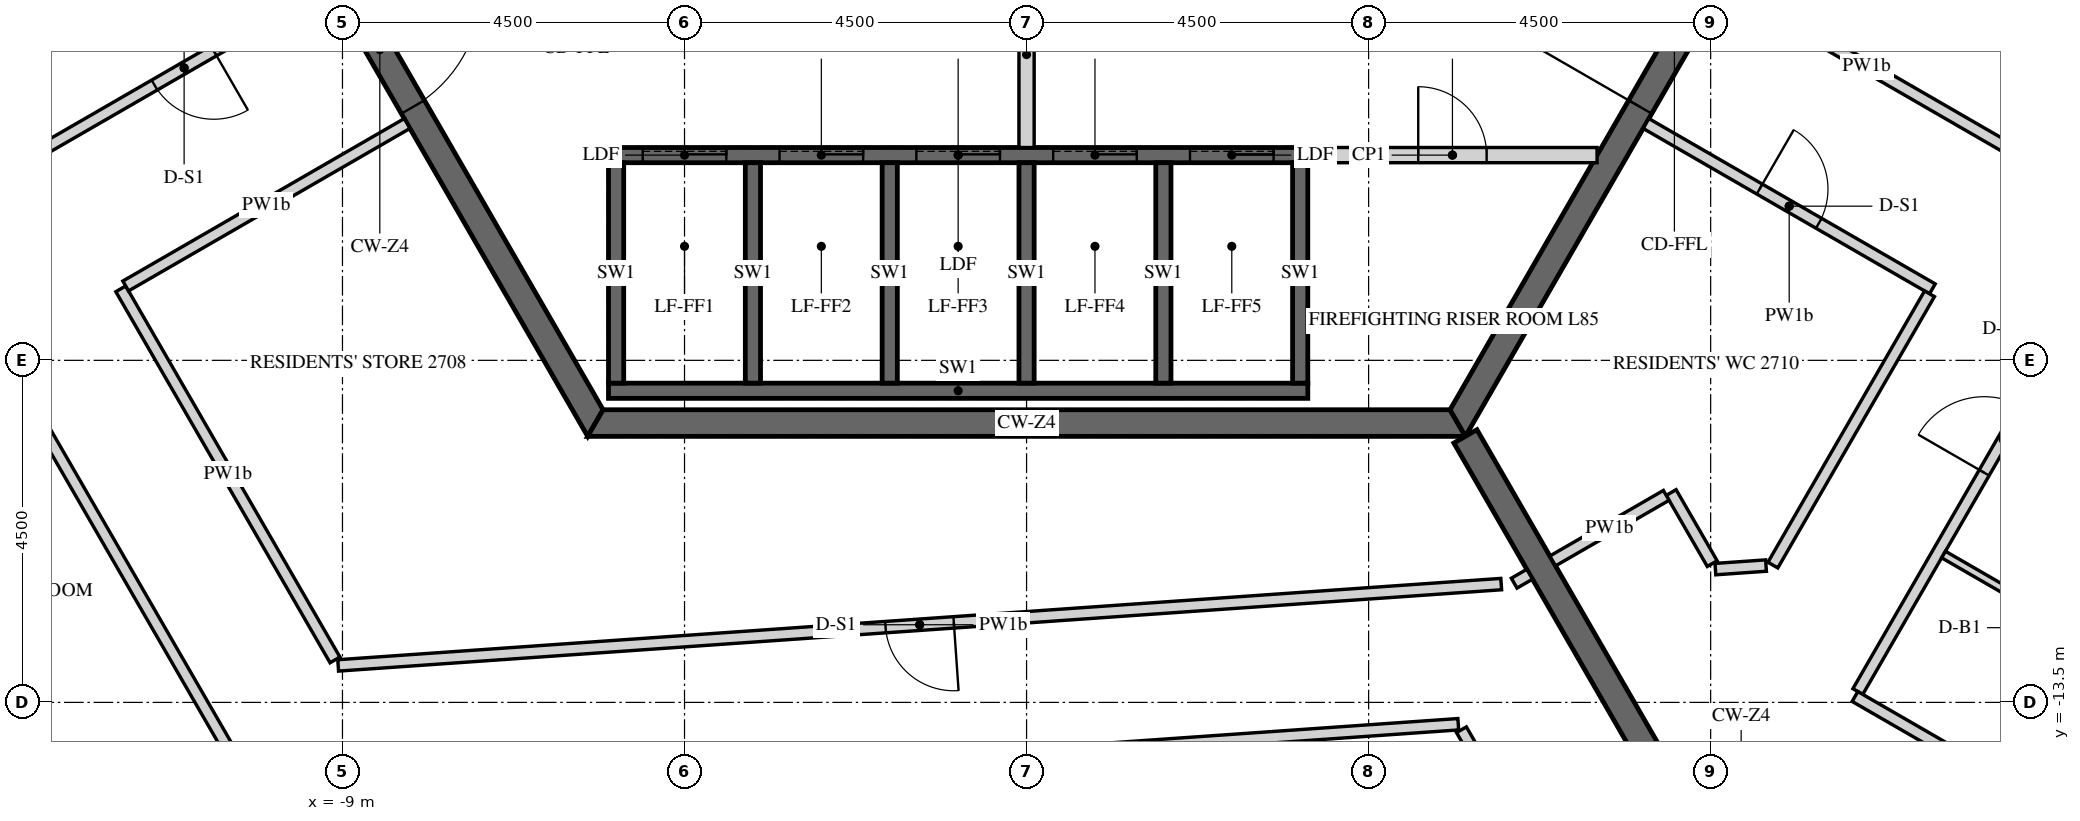
"""IFC4 building model, lengths in metres.
Left out: names, types, materials, properties, quantities, classifications, styles, units other than length and angle.
Written with IfcOpenShell. Run it as: python <this file> out.ifc"""

import sys

from ifc_helpers import new_model, si_unit, direction, frame, frame_2d, origin, place, context, subcontext, project, spatial, polyline, rectangle, outline, extrude, element, fill, save


model = new_model("IFC4")
c1 = context("Model", 3, precision=1e-05, world=origin(), true_north=direction((0.0, 1.0)))
c2 = subcontext(c1, "Body", "Model", "MODEL_VIEW")
j1 = project(units=[si_unit("LENGTHUNIT", "METRE"), si_unit("PLANEANGLEUNIT", "RADIAN")], contexts=[c1])
p1 = place(None, origin())
s1 = spatial("IfcSite", under=j1, at=p1, CompositionType="ELEMENT")
p2 = place(p1, origin())
s2 = spatial("IfcBuilding", under=s1, at=p2, CompositionType="ELEMENT")
p3 = place(p2, frame((0.0, 0.0, 353.4)))
s3 = spatial("IfcBuildingStorey", under=s2, at=p3, CompositionType="ELEMENT", Elevation=353.4)
p4 = place(p3, frame((-11.345, 0.0, -0.15), z_axis=(0.0, 0.0, 1.0), x_axis=(0.499995046907, -0.866028263435, 0.0)))
e1 = element("IfcWall", 1, at=p4, inside=s3, PredefinedType="SHEAR", context=c2, shape_type="SweptSolid", body=[
    extrude(outline(polyline([(-0.101, -0.175), (11.446, -0.175), (11.244, 0.175), (0.101, 0.175), (-0.101, -0.175)])), origin(), (0.0, 0.0, 1.0), 3.9),
])
p5 = place(p4, frame((4.744, 0.0, 0.15)))
e2 = element("IfcOpeningElement", 2, at=p5, cuts=e1, PredefinedType="OPENING", context=c2, shape_type="SweptSolid", body=[
    extrude(rectangle(XDim=1.8, YDim=2.4, at=frame_2d((0.9, 1.2))), frame((0.0, 0.185, 0.0), z_axis=(0.0, -1.0, 0.0), x_axis=(1.0, 0.0, 0.0)), (0.0, 0.0, 1.0), 0.37),
])
p6 = place(p3, frame((-5.673, -9.825, -0.15), z_axis=(0.0, 0.0, 1.0), x_axis=(1.0, 0.0, 0.0)))
e3 = element("IfcWall", 3, at=p6, inside=s3, PredefinedType="SHEAR", context=c2, shape_type="SweptSolid", body=[
    extrude(outline(polyline([(-0.101, -0.175), (11.446, -0.175), (11.244, 0.175), (0.101, 0.175), (-0.101, -0.175)])), origin(), (0.0, 0.0, 1.0), 3.9),
])
p7 = place(p3, frame((5.673, -9.825, -0.15), z_axis=(0.0, 0.0, 1.0), x_axis=(0.499995046907, 0.866028263435, 0.0)))
e4 = element("IfcWall", 4, at=p7, inside=s3, PredefinedType="SHEAR", context=c2, shape_type="SweptSolid", body=[
    extrude(outline(polyline([(-0.101, -0.175), (11.446, -0.175), (11.244, 0.175), (0.101, 0.175), (-0.101, -0.175)])), origin(), (0.0, 0.0, 1.0), 3.9),
])
p8 = place(p7, frame((4.801, 0.0, 0.15)))
e5 = element("IfcOpeningElement", 5, at=p8, cuts=e4, PredefinedType="OPENING", context=c2, shape_type="SweptSolid", body=[
    extrude(rectangle(XDim=1.8, YDim=2.4, at=frame_2d((0.9, 1.2))), frame((0.0, 0.185, 0.0), z_axis=(0.0, -1.0, 0.0), x_axis=(1.0, 0.0, 0.0)), (0.0, 0.0, 1.0), 0.37),
])
p9 = place(p3, frame((5.773, -10.0, -0.15), z_axis=(0.0, 0.0, 1.0), x_axis=(0.500007911273, -0.866020836161, 0.0)))
e6 = element("IfcWall", 6, at=p9, inside=s3, PredefinedType="SHEAR", context=c2, shape_type="SweptSolid", body=[
    extrude(rectangle(XDim=14.51, YDim=0.35, at=frame_2d((7.255, 0.0))), origin(), (0.0, 0.0, 1.0), 3.9),
])
p10 = place(p9, frame((6.355, 0.0, 0.15)))
e7 = element("IfcOpeningElement", 7, at=p10, cuts=e6, PredefinedType="OPENING", context=c2, shape_type="SweptSolid", body=[
    extrude(rectangle(XDim=1.8, YDim=2.4, at=frame_2d((0.9, 1.2))), frame((0.0, 0.185, 0.0), z_axis=(0.0, -1.0, 0.0), x_axis=(1.0, 0.0, 0.0)), (0.0, 0.0, 1.0), 0.37),
])
p11 = place(p3, frame((-5.5, -6.3, -0.25), z_axis=(0.0, 0.0, 1.0), x_axis=(1.0, 0.0, 0.0)))
e8 = element("IfcWall", 8, at=p11, inside=s3, PredefinedType="SHEAR", context=c2, shape_type="SweptSolid", body=[
    extrude(rectangle(XDim=9.2, YDim=0.2, at=frame_2d((4.6, 0.0))), origin(), (0.0, 0.0, 1.0), 3.9),
])
p12 = place(p11, frame((0.45, 0.0, 0.25)))
e9 = element("IfcOpeningElement", 9, at=p12, cuts=e8, PredefinedType="OPENING", context=c2, shape_type="SweptSolid", body=[
    extrude(rectangle(XDim=1.1, YDim=2.1, at=frame_2d((0.55, 1.05))), frame((0.0, 0.11, 0.0), z_axis=(0.0, -1.0, 0.0), x_axis=(1.0, 0.0, 0.0)), (0.0, 0.0, 1.0), 0.22),
])
p13 = place(p11, frame((2.25, 0.0, 0.25)))
e10 = element("IfcOpeningElement", 10, at=p13, cuts=e8, PredefinedType="OPENING", context=c2, shape_type="SweptSolid", body=[
    extrude(rectangle(XDim=1.1, YDim=2.1, at=frame_2d((0.55, 1.05))), frame((0.0, 0.11, 0.0), z_axis=(0.0, -1.0, 0.0), x_axis=(1.0, 0.0, 0.0)), (0.0, 0.0, 1.0), 0.22),
])
p14 = place(p11, frame((4.05, 0.0, 0.25)))
e11 = element("IfcOpeningElement", 11, at=p14, cuts=e8, PredefinedType="OPENING", context=c2, shape_type="SweptSolid", body=[
    extrude(rectangle(XDim=1.1, YDim=2.1, at=frame_2d((0.55, 1.05))), frame((0.0, 0.11, 0.0), z_axis=(0.0, -1.0, 0.0), x_axis=(1.0, 0.0, 0.0)), (0.0, 0.0, 1.0), 0.22),
])
p15 = place(p11, frame((5.85, 0.0, 0.25)))
e12 = element("IfcOpeningElement", 12, at=p15, cuts=e8, PredefinedType="OPENING", context=c2, shape_type="SweptSolid", body=[
    extrude(rectangle(XDim=1.1, YDim=2.1, at=frame_2d((0.55, 1.05))), frame((0.0, 0.11, 0.0), z_axis=(0.0, -1.0, 0.0), x_axis=(1.0, 0.0, 0.0)), (0.0, 0.0, 1.0), 0.22),
])
p16 = place(p11, frame((7.65, 0.0, 0.25)))
e13 = element("IfcOpeningElement", 13, at=p16, cuts=e8, PredefinedType="OPENING", context=c2, shape_type="SweptSolid", body=[
    extrude(rectangle(XDim=1.1, YDim=2.1, at=frame_2d((0.55, 1.05))), frame((0.0, 0.11, 0.0), z_axis=(0.0, -1.0, 0.0), x_axis=(1.0, 0.0, 0.0)), (0.0, 0.0, 1.0), 0.22),
])
p17 = place(p3, frame((-5.5, -9.4, -0.25), z_axis=(0.0, 0.0, 1.0), x_axis=(1.0, 0.0, 0.0)))
e14 = element("IfcWall", 14, at=p17, inside=s3, PredefinedType="SHEAR", context=c2, shape_type="SweptSolid", body=[
    extrude(rectangle(XDim=9.2, YDim=0.2, at=frame_2d((4.6, 0.0))), origin(), (0.0, 0.0, 1.0), 3.9),
])
for number, where, z_axis, x_axis in (
    (15, (-5.4, -9.3, -0.25), (0.0, 0.0, 1.0), (0.0, 1.0, 0.0)),
    (16, (-3.6, -9.3, -0.25), (0.0, 0.0, 1.0), (0.0, 1.0, 0.0)),
    (17, (-1.8, -9.3, -0.25), (0.0, 0.0, 1.0), (0.0, 1.0, 0.0)),
    (18, (0.0, -9.3, -0.25), (0.0, 0.0, 1.0), (0.0, 1.0, 0.0)),
    (19, (1.8, -9.3, -0.25), (0.0, 0.0, 1.0), (0.0, 1.0, 0.0)),
    (20, (3.6, -9.3, -0.25), (0.0, 0.0, 1.0), (0.0, 1.0, 0.0)),
):
    element("IfcWall", number, at=place(p3, frame(where, z_axis=z_axis, x_axis=x_axis)), inside=s3, PredefinedType="SHEAR", context=c2, shape_type="SweptSolid", body=[
        extrude(rectangle(XDim=2.9, YDim=0.2, at=frame_2d((1.45, 0.0))), origin(), (0.0, 0.0, 1.0), 3.9),
    ])
p18 = place(p3, frame((0.0, -6.2, 0.0), z_axis=(0.0, 0.0, 1.0), x_axis=(0.0, 1.0, 0.0)))
e21 = element("IfcWall", 21, at=p18, inside=s3, PredefinedType="PARTITIONING", context=c2, shape_type="SweptSolid", body=[
    extrude(rectangle(XDim=6.1, YDim=0.2, at=frame_2d((3.05, 0.0))), origin(), (0.0, 0.0, 1.0), 3.65),
])
p19 = place(p3, frame((3.7, -6.3, 0.0), z_axis=(0.0, 0.0, 1.0), x_axis=(1.0, 0.0, 0.0)))
e22 = element("IfcWall", 22, at=p19, inside=s3, PredefinedType="PARTITIONING", context=c2, shape_type="SweptSolid", body=[
    extrude(rectangle(XDim=3.806, YDim=0.2, at=frame_2d((1.903, 0.0))), origin(), (0.0, 0.0, 1.0), 3.65),
])
p20 = place(p19, frame((1.453, 0.0, 0.0)))
e23 = element("IfcOpeningElement", 23, at=p20, cuts=e22, PredefinedType="OPENING", context=c2, shape_type="SweptSolid", body=[
    extrude(rectangle(XDim=0.9, YDim=2.1, at=frame_2d((0.45, 1.05))), frame((0.0, 0.11, 0.0), z_axis=(0.0, -1.0, 0.0), x_axis=(1.0, 0.0, 0.0)), (0.0, 0.0, 1.0), 0.22),
])
p21 = place(p3, frame((-17.036, -2.792, 0.0), z_axis=(0.0, 0.0, 1.0), x_axis=(0.500006428338, -0.86602169235, 0.0)))
e24 = element("IfcWall", 24, at=p21, inside=s3, PredefinedType="PARTITIONING", context=c2, shape_type="SweptSolid", body=[
    extrude(rectangle(XDim=13.966, YDim=0.15, at=frame_2d((6.983, 0.0))), origin(), (0.0, 0.0, 1.0), 2.82),
])
p22 = place(p21, frame((3.325, 0.0, 0.0)))
e25 = element("IfcOpeningElement", 25, at=p22, cuts=e24, PredefinedType="OPENING", context=c2, shape_type="SweptSolid", body=[
    extrude(rectangle(XDim=1.0, YDim=2.1, at=frame_2d((0.5, 1.05))), frame((0.0, 0.085, 0.0), z_axis=(0.0, -1.0, 0.0), x_axis=(1.0, 0.0, 0.0)), (0.0, 0.0, 1.0), 0.17),
])
p23 = place(p3, frame((-9.97, -14.882, 0.0), z_axis=(0.0, 0.0, 1.0), x_axis=(0.997564384496, 0.06975169378, 0.0)))
e26 = element("IfcWall", 26, at=p23, inside=s3, PredefinedType="PARTITIONING", context=c2, shape_type="SweptSolid", body=[
    extrude(rectangle(XDim=15.688, YDim=0.15, at=frame_2d((7.844, 0.0))), origin(), (0.0, 0.0, 1.0), 2.82),
])
p24 = place(p3, frame((5.721, -13.86, 0.0), z_axis=(0.0, 0.0, 1.0), x_axis=(0.499970524249, -0.866042420948, 0.0)))
e27 = element("IfcWall", 27, at=p24, inside=s3, PredefinedType="PARTITIONING", context=c2, shape_type="SweptSolid", body=[
    extrude(rectangle(XDim=5.339, YDim=0.15, at=frame_2d((2.669, 0.0))), origin(), (0.0, 0.0, 1.0), 2.82),
])
p25 = place(p3, frame((-9.2, -4.066, 0.0), z_axis=(0.0, 0.0, 1.0), x_axis=(-0.866013608182, -0.500020430026, 0.0)))
e28 = element("IfcWall", 28, at=p25, inside=s3, PredefinedType="PARTITIONING", context=c2, shape_type="SweptSolid", body=[
    extrude(rectangle(XDim=4.35, YDim=0.15, at=frame_2d((2.175, 0.0))), origin(), (0.0, 0.0, 1.0), 2.82),
])
p26 = place(p25, frame((1.725, 0.0, 0.0)))
e29 = element("IfcOpeningElement", 29, at=p26, cuts=e28, PredefinedType="OPENING", context=c2, shape_type="SweptSolid", body=[
    extrude(rectangle(XDim=0.9, YDim=2.1, at=frame_2d((0.45, 1.05))), frame((0.0, 0.085, 0.0), z_axis=(0.0, -1.0, 0.0), x_axis=(1.0, 0.0, 0.0)), (0.0, 0.0, 1.0), 0.17),
])
p27 = place(p3, frame((6.619, -11.814, 0.0), z_axis=(0.0, 0.0, 1.0), x_axis=(-0.865544827262, -0.500831460673, 0.0)))
e30 = element("IfcWall", 30, at=p27, inside=s3, PredefinedType="PARTITIONING", context=c2, shape_type="SweptSolid", body=[
    extrude(rectangle(XDim=0.235, YDim=0.15, at=frame_2d((0.117, 0.0))), origin(), (0.0, 0.0, 1.0), 2.82),
])
p28 = place(p3, frame((6.245, -11.944, 0.0), z_axis=(0.0, 0.0, 1.0), x_axis=(-0.997564707029, -0.069747080866, 0.0)))
e31 = element("IfcWall", 31, at=p28, inside=s3, PredefinedType="PARTITIONING", context=c2, shape_type="SweptSolid", body=[
    extrude(rectangle(XDim=15.339, YDim=0.15, at=frame_2d((7.669, 0.0))), origin(), (0.0, 0.0, 1.0), 2.82),
])
p29 = place(p28, frame((7.219, 0.0, 0.0)))
e32 = element("IfcOpeningElement", 32, at=p29, cuts=e31, PredefinedType="OPENING", context=c2, shape_type="SweptSolid", body=[
    extrude(rectangle(XDim=0.9, YDim=2.1, at=frame_2d((0.45, 1.05))), frame((0.0, 0.085, 0.0), z_axis=(0.0, -1.0, 0.0), x_axis=(1.0, 0.0, 0.0)), (0.0, 0.0, 1.0), 0.17),
])
p30 = place(p3, frame((-9.098, -12.941, 0.0), z_axis=(0.0, 0.0, 1.0), x_axis=(-0.500009875128, 0.866019702301, 0.0)))
e33 = element("IfcWall", 33, at=p30, inside=s3, PredefinedType="PARTITIONING", context=c2, shape_type="SweptSolid", body=[
    extrude(rectangle(XDim=5.637, YDim=0.15, at=frame_2d((2.819, 0.0))), origin(), (0.0, 0.0, 1.0), 2.82),
])
p31 = place(p3, frame((-11.852, -8.022, 0.0), z_axis=(0.0, 0.0, 1.0), x_axis=(0.866038183914, 0.499977863513, 0.0)))
e34 = element("IfcWall", 34, at=p31, inside=s3, PredefinedType="PARTITIONING", context=c2, shape_type="SweptSolid", body=[
    extrude(rectangle(XDim=4.275, YDim=0.15, at=frame_2d((2.138, 0.0))), origin(), (0.0, 0.0, 1.0), 2.82),
])
p32 = place(p3, frame((10.937, -13.357, 0.0), z_axis=(0.0, 0.0, 1.0), x_axis=(0.499993317597, 0.866029261837, 0.0)))
e35 = element("IfcWall", 35, at=p32, inside=s3, PredefinedType="PARTITIONING", context=c2, shape_type="SweptSolid", body=[
    extrude(rectangle(XDim=13.966, YDim=0.15, at=frame_2d((6.983, 0.0))), origin(), (0.0, 0.0, 1.0), 2.82),
])
p33 = place(p32, frame((3.325, 0.0, 0.0)))
e36 = element("IfcOpeningElement", 36, at=p33, cuts=e35, PredefinedType="OPENING", context=c2, shape_type="SweptSolid", body=[
    extrude(rectangle(XDim=1.0, YDim=2.1, at=frame_2d((0.5, 1.05))), frame((0.0, 0.085, 0.0), z_axis=(0.0, -1.0, 0.0), x_axis=(1.0, 0.0, 0.0)), (0.0, 0.0, 1.0), 0.17),
])
p34 = place(p3, frame((14.363, -15.422, 0.0), z_axis=(0.0, 0.0, 1.0), x_axis=(-0.866026010844, 0.49999894854, 0.0)))
e37 = element("IfcWall", 37, at=p34, inside=s3, PredefinedType="PARTITIONING", context=c2, shape_type="SweptSolid", body=[
    extrude(rectangle(XDim=4.0, YDim=0.15, at=frame_2d((2.0, 0.0))), origin(), (0.0, 0.0, 1.0), 2.82),
])
p35 = place(p3, frame((12.902, -6.203, 0.0), z_axis=(0.0, 0.0, 1.0), x_axis=(-0.866023907196, 0.500002592159, 0.0)))
e38 = element("IfcWall", 38, at=p35, inside=s3, PredefinedType="PARTITIONING", context=c2, shape_type="SweptSolid", body=[
    extrude(rectangle(XDim=4.275, YDim=0.15, at=frame_2d((2.137, 0.0))), origin(), (0.0, 0.0, 1.0), 2.82),
])
p36 = place(p3, frame((8.15, -5.884, 0.0), z_axis=(0.0, 0.0, 1.0), x_axis=(0.866027639635, -0.499996127374, 0.0)))
e39 = element("IfcWall", 39, at=p36, inside=s3, PredefinedType="PARTITIONING", context=c2, shape_type="SweptSolid", body=[
    extrude(rectangle(XDim=4.35, YDim=0.15, at=frame_2d((2.175, 0.0))), origin(), (0.0, 0.0, 1.0), 2.82),
])
p37 = place(p36, frame((1.725, 0.0, 0.0)))
e40 = element("IfcOpeningElement", 40, at=p37, cuts=e39, PredefinedType="OPENING", context=c2, shape_type="SweptSolid", body=[
    extrude(rectangle(XDim=0.9, YDim=2.1, at=frame_2d((0.45, 1.05))), frame((0.0, 0.085, 0.0), z_axis=(0.0, -1.0, 0.0), x_axis=(1.0, 0.0, 0.0)), (0.0, 0.0, 1.0), 0.17),
])
p38 = place(p3, frame((11.879, -8.124, 0.0), z_axis=(0.0, 0.0, 1.0), x_axis=(-0.500006178143, -0.866021836803, 0.0)))
e41 = element("IfcWall", 41, at=p38, inside=s3, PredefinedType="PARTITIONING", context=c2, shape_type="SweptSolid", body=[
    extrude(rectangle(XDim=4.122, YDim=0.15, at=frame_2d((2.061, 0.0))), origin(), (0.0, 0.0, 1.0), 2.82),
])
p39 = place(p3, frame((9.729, -11.7, 0.0), z_axis=(0.0, 0.0, 1.0), x_axis=(-0.997585124395, -0.069454442519, 0.0)))
e42 = element("IfcWall", 42, at=p39, inside=s3, PredefinedType="PARTITIONING", context=c2, shape_type="SweptSolid", body=[
    extrude(rectangle(XDim=0.668, YDim=0.15, at=frame_2d((0.334, 0.0))), origin(), (0.0, 0.0, 1.0), 2.82),
])
p40 = place(p3, frame((9.021, -11.674, 0.0), z_axis=(0.0, 0.0, 1.0), x_axis=(-0.500126914667, 0.865952117167, 0.0)))
e43 = element("IfcWall", 43, at=p40, inside=s3, PredefinedType="PARTITIONING", context=c2, shape_type="SweptSolid", body=[
    extrude(rectangle(XDim=1.08, YDim=0.15, at=frame_2d((0.54, 0.0))), origin(), (0.0, 0.0, 1.0), 2.82),
])
p41 = place(p3, frame((8.416, -10.777, 0.0), z_axis=(0.0, 0.0, 1.0), x_axis=(-0.866074815912, -0.499914405916, 0.0)))
e44 = element("IfcWall", 44, at=p41, inside=s3, PredefinedType="PARTITIONING", context=c2, shape_type="SweptSolid", body=[
    extrude(rectangle(XDim=1.725, YDim=0.15, at=frame_2d((0.862, 0.0))), origin(), (0.0, 0.0, 1.0), 2.82),
])
p42 = place(p3, frame((12.064, -11.555, 0.0), z_axis=(0.0, 0.0, 1.0), x_axis=(0.866037464623, -0.499979109433, 0.0)))
e45 = element("IfcWall", 45, at=p42, inside=s3, PredefinedType="PARTITIONING", context=c2, shape_type="SweptSolid", body=[
    extrude(rectangle(XDim=3.925, YDim=0.1, at=frame_2d((1.962, 0.0))), origin(), (0.0, 0.0, 1.0), 2.82),
])
p43 = place(p42, frame((1.525, 0.0, 0.0)))
e46 = element("IfcOpeningElement", 46, at=p43, cuts=e45, PredefinedType="OPENING", context=c2, shape_type="SweptSolid", body=[
    extrude(rectangle(XDim=0.8, YDim=2.1, at=frame_2d((0.4, 1.05))), frame((0.0, 0.06, 0.0), z_axis=(0.0, -1.0, 0.0), x_axis=(1.0, 0.0, 0.0)), (0.0, 0.0, 1.0), 0.12),
])
p44 = place(p5, origin())
e47 = element("IfcDoor", 47, at=p44, inside=s3, OperationType="DOUBLE_DOOR_SINGLE_SWING", PredefinedType="DOOR", context=c2, shape_type="SweptSolid", body=[
    extrude(rectangle(XDim=1.8, YDim=2.4, at=frame_2d((0.9, 1.2))), frame((0.0, 0.025, 0.0), z_axis=(0.0, -1.0, 0.0), x_axis=(1.0, 0.0, 0.0)), (0.0, 0.0, 1.0), 0.05),
])
fill(e2, e47)
p45 = place(p8, origin())
e48 = element("IfcDoor", 48, at=p45, inside=s3, OperationType="DOUBLE_DOOR_SINGLE_SWING", PredefinedType="DOOR", context=c2, shape_type="SweptSolid", body=[
    extrude(rectangle(XDim=1.8, YDim=2.4, at=frame_2d((0.9, 1.2))), frame((0.0, 0.025, 0.0), z_axis=(0.0, -1.0, 0.0), x_axis=(1.0, 0.0, 0.0)), (0.0, 0.0, 1.0), 0.05),
])
fill(e5, e48)
p46 = place(p20, origin())
e49 = element("IfcDoor", 49, at=p46, inside=s3, OperationType="SINGLE_SWING_LEFT", PredefinedType="DOOR", context=c2, shape_type="SweptSolid", body=[
    extrude(rectangle(XDim=0.9, YDim=2.1, at=frame_2d((0.45, 1.05))), frame((0.0, 0.025, 0.0), z_axis=(0.0, -1.0, 0.0), x_axis=(1.0, 0.0, 0.0)), (0.0, 0.0, 1.0), 0.05),
])
fill(e23, e49)
p47 = place(p12, origin())
e50 = element("IfcDoor", 50, at=p47, inside=s3, OperationType="SLIDING_TO_LEFT", PredefinedType="DOOR", context=c2, shape_type="SweptSolid", body=[
    extrude(rectangle(XDim=1.1, YDim=2.1, at=frame_2d((0.55, 1.05))), frame((0.0, 0.025, 0.0), z_axis=(0.0, -1.0, 0.0), x_axis=(1.0, 0.0, 0.0)), (0.0, 0.0, 1.0), 0.05),
])
fill(e9, e50)
p48 = place(p13, origin())
e51 = element("IfcDoor", 51, at=p48, inside=s3, OperationType="SLIDING_TO_LEFT", PredefinedType="DOOR", context=c2, shape_type="SweptSolid", body=[
    extrude(rectangle(XDim=1.1, YDim=2.1, at=frame_2d((0.55, 1.05))), frame((0.0, 0.025, 0.0), z_axis=(0.0, -1.0, 0.0), x_axis=(1.0, 0.0, 0.0)), (0.0, 0.0, 1.0), 0.05),
])
fill(e10, e51)
p49 = place(p14, origin())
e52 = element("IfcDoor", 52, at=p49, inside=s3, OperationType="SLIDING_TO_LEFT", PredefinedType="DOOR", context=c2, shape_type="SweptSolid", body=[
    extrude(rectangle(XDim=1.1, YDim=2.1, at=frame_2d((0.55, 1.05))), frame((0.0, 0.025, 0.0), z_axis=(0.0, -1.0, 0.0), x_axis=(1.0, 0.0, 0.0)), (0.0, 0.0, 1.0), 0.05),
])
fill(e11, e52)
p50 = place(p15, origin())
e53 = element("IfcDoor", 53, at=p50, inside=s3, OperationType="SLIDING_TO_LEFT", PredefinedType="DOOR", context=c2, shape_type="SweptSolid", body=[
    extrude(rectangle(XDim=1.1, YDim=2.1, at=frame_2d((0.55, 1.05))), frame((0.0, 0.025, 0.0), z_axis=(0.0, -1.0, 0.0), x_axis=(1.0, 0.0, 0.0)), (0.0, 0.0, 1.0), 0.05),
])
fill(e12, e53)
p51 = place(p16, origin())
e54 = element("IfcDoor", 54, at=p51, inside=s3, OperationType="SLIDING_TO_LEFT", PredefinedType="DOOR", context=c2, shape_type="SweptSolid", body=[
    extrude(rectangle(XDim=1.1, YDim=2.1, at=frame_2d((0.55, 1.05))), frame((0.0, 0.025, 0.0), z_axis=(0.0, -1.0, 0.0), x_axis=(1.0, 0.0, 0.0)), (0.0, 0.0, 1.0), 0.05),
])
fill(e13, e54)
p52 = place(p33, origin())
e55 = element("IfcDoor", 55, at=p52, inside=s3, OperationType="SINGLE_SWING_LEFT", PredefinedType="DOOR", context=c2, shape_type="SweptSolid", body=[
    extrude(rectangle(XDim=1.0, YDim=2.1, at=frame_2d((0.5, 1.05))), frame((0.0, 0.025, 0.0), z_axis=(0.0, -1.0, 0.0), x_axis=(1.0, 0.0, 0.0)), (0.0, 0.0, 1.0), 0.05),
])
fill(e36, e55)
p53 = place(p26, origin())
e56 = element("IfcDoor", 56, at=p53, inside=s3, OperationType="SINGLE_SWING_LEFT", PredefinedType="DOOR", context=c2, shape_type="SweptSolid", body=[
    extrude(rectangle(XDim=0.9, YDim=2.1, at=frame_2d((0.45, 1.05))), frame((0.0, 0.025, 0.0), z_axis=(0.0, -1.0, 0.0), x_axis=(1.0, 0.0, 0.0)), (0.0, 0.0, 1.0), 0.05),
])
fill(e29, e56)
p54 = place(p29, origin())
e57 = element("IfcDoor", 57, at=p54, inside=s3, OperationType="SINGLE_SWING_RIGHT", PredefinedType="DOOR", context=c2, shape_type="SweptSolid", body=[
    extrude(rectangle(XDim=0.9, YDim=2.1, at=frame_2d((0.45, 1.05))), frame((0.0, 0.025, 0.0), z_axis=(0.0, -1.0, 0.0), x_axis=(1.0, 0.0, 0.0)), (0.0, 0.0, 1.0), 0.05),
])
fill(e32, e57)
p55 = place(p37, origin())
e58 = element("IfcDoor", 58, at=p55, inside=s3, OperationType="SINGLE_SWING_LEFT", PredefinedType="DOOR", context=c2, shape_type="SweptSolid", body=[
    extrude(rectangle(XDim=0.9, YDim=2.1, at=frame_2d((0.45, 1.05))), frame((0.0, 0.025, 0.0), z_axis=(0.0, -1.0, 0.0), x_axis=(1.0, 0.0, 0.0)), (0.0, 0.0, 1.0), 0.05),
])
fill(e40, e58)
save(model, sys.argv[1])
